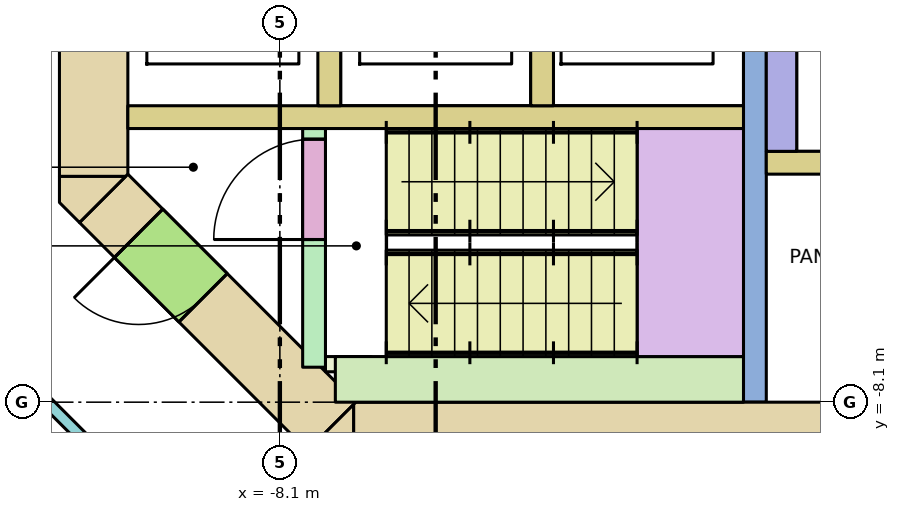
"""IFC4 building model, lengths in metres.
Left out: names, types, materials, properties, quantities, classifications, styles, units other than length and angle.
Written with IfcOpenShell. Run it as: python <this file> out.ifc"""

import sys

from ifc_helpers import new_model, si_unit, direction, frame, frame_2d, origin, place, context, subcontext, project, spatial, polyline, rectangle, outline, extrude, element, fill, save


model = new_model("IFC4")
c1 = context("Model", 3, precision=1e-05, world=origin(), true_north=direction((0.0, 1.0)))
c2 = subcontext(c1, "Body", "Model", "MODEL_VIEW")
j1 = project(units=[si_unit("LENGTHUNIT", "METRE"), si_unit("PLANEANGLEUNIT", "RADIAN")], contexts=[c1])
p1 = place(None, origin())
s1 = spatial("IfcSite", under=j1, at=p1, CompositionType="ELEMENT")
p2 = place(p1, origin())
s2 = spatial("IfcBuilding", under=s1, at=p2, CompositionType="ELEMENT")
p3 = place(p2, frame((0.0, 0.0, 86.6)))
s3 = spatial("IfcBuildingStorey", under=s2, at=p3, CompositionType="ELEMENT", Elevation=86.6)
p4 = place(p3, frame((-7.13, -8.55, -0.28), z_axis=(0.0, 0.0, 1.0), x_axis=(1.0, 0.0, 0.0)))
e1 = element("IfcWall", 1, at=p4, inside=s3, PredefinedType="SHEAR", context=c2, shape_type="SweptSolid", body=[
    extrude(rectangle(XDim=14.26, YDim=0.9, at=frame_2d((7.13, 0.0))), origin(), (0.0, 0.0, 1.0), 4.0),
])
p5 = place(p4, frame((8.08, 0.0, 0.28)))
e2 = element("IfcOpeningElement", 2, at=p5, cuts=e1, PredefinedType="OPENING", context=c2, shape_type="SweptSolid", body=[
    extrude(rectangle(XDim=0.7, YDim=2.1, at=frame_2d((0.35, 1.05))), frame((0.0, 0.46, 0.0), z_axis=(0.0, -1.0, 0.0), x_axis=(1.0, 0.0, 0.0)), (0.0, 0.0, 1.0), 0.92),
])
p6 = place(p4, frame((6.205, 0.0, 0.28)))
e3 = element("IfcOpeningElement", 3, at=p6, cuts=e1, PredefinedType="OPENING", context=c2, shape_type="SweptSolid", body=[
    extrude(rectangle(XDim=0.9, YDim=2.1, at=frame_2d((0.45, 1.05))), frame((0.0, 0.46, 0.0), z_axis=(0.0, -1.0, 0.0), x_axis=(1.0, 0.0, 0.0)), (0.0, 0.0, 1.0), 0.92),
])
p7 = place(p4, frame((10.667, 0.0, 0.28)))
e4 = element("IfcOpeningElement", 4, at=p7, cuts=e1, PredefinedType="OPENING", context=c2, shape_type="SweptSolid", body=[
    extrude(rectangle(XDim=0.9, YDim=2.1, at=frame_2d((0.45, 1.05))), frame((0.0, 0.46, 0.0), z_axis=(0.0, -1.0, 0.0), x_axis=(1.0, 0.0, 0.0)), (0.0, 0.0, 1.0), 0.92),
])
p8 = place(p3, frame((-10.55, -5.13, -0.28), z_axis=(0.0, 0.0, 1.0), x_axis=(0.0, 1.0, 0.0)))
e5 = element("IfcWall", 5, at=p8, inside=s3, PredefinedType="SHEAR", context=c2, shape_type="SweptSolid", body=[
    extrude(rectangle(XDim=10.26, YDim=0.9, at=frame_2d((5.13, 0.0))), origin(), (0.0, 0.0, 1.0), 4.0),
])
p9 = place(p8, frame((4.13, 0.0, 0.28)))
e6 = element("IfcOpeningElement", 6, at=p9, cuts=e5, PredefinedType="OPENING", context=c2, shape_type="SweptSolid", body=[
    extrude(rectangle(XDim=2.0, YDim=2.1, at=frame_2d((1.0, 1.05))), frame((0.0, 0.46, 0.0), z_axis=(0.0, -1.0, 0.0), x_axis=(1.0, 0.0, 0.0)), (0.0, 0.0, 1.0), 0.92),
])
p10 = place(p3, frame((-7.418, -8.418, -0.28), z_axis=(0.0, 0.0, 1.0), x_axis=(-0.707106781187, 0.707106781187, 0.0)))
e7 = element("IfcWall", 7, at=p10, inside=s3, PredefinedType="SHEAR", context=c2, shape_type="SweptSolid", body=[
    extrude(rectangle(XDim=4.243, YDim=0.9, at=frame_2d((2.121, 0.0))), origin(), (0.0, 0.0, 1.0), 4.0),
])
p11 = place(p10, frame((2.393, 0.0, 0.28)))
e8 = element("IfcOpeningElement", 8, at=p11, cuts=e7, PredefinedType="OPENING", context=c2, shape_type="SweptSolid", body=[
    extrude(rectangle(XDim=1.2, YDim=2.1, at=frame_2d((0.6, 1.05))), frame((0.0, 0.46, 0.0), z_axis=(0.0, -1.0, 0.0), x_axis=(1.0, 0.0, 0.0)), (0.0, 0.0, 1.0), 0.92),
])
p12 = place(p3, frame((0.0, 0.0, -0.28)))
e9 = element("IfcWall", 9, at=p12, inside=s3, PredefinedType="SHEAR", context=c2, shape_type="SweptSolid", body=[
    extrude(outline(polyline([(-7.473, -9.0), (-7.736, -8.736), (-7.13, -8.13), (-7.13, -9.0), (-7.473, -9.0)])), origin(), (0.0, 0.0, 1.0), 4.0),
])
p13 = place(p3, frame((0.0, 0.0, -0.28)))
e10 = element("IfcWall", 10, at=p13, inside=s3, PredefinedType="SHEAR", context=c2, shape_type="SweptSolid", body=[
    extrude(outline(polyline([(-11.0, -5.473), (-11.0, -5.13), (-10.13, -5.13), (-10.736, -5.736), (-11.0, -5.473)])), origin(), (0.0, 0.0, 1.0), 4.0),
])
p14 = place(p3, frame((-10.1, -4.35, 0.0), z_axis=(0.0, 0.0, 1.0), x_axis=(1.0, 0.0, 0.0)))
e11 = element("IfcWall", 11, at=p14, inside=s3, PredefinedType="SOLIDWALL", context=c2, shape_type="SweptSolid", body=[
    extrude(rectangle(XDim=8.1, YDim=0.3, at=frame_2d((4.05, 0.0))), origin(), (0.0, 0.0, 1.0), 3.72),
])
for number, where, z_axis, x_axis in (
    (12, (-7.45, -4.2, 0.0), (0.0, 0.0, 1.0), (0.0, 1.0, 0.0)),
    (13, (-4.65, -4.2, 0.0), (0.0, 0.0, 1.0), (0.0, 1.0, 0.0)),
):
    element("IfcWall", number, at=place(p3, frame(where, z_axis=z_axis, x_axis=x_axis)), inside=s3, PredefinedType="SOLIDWALL", context=c2, shape_type="SweptSolid", body=[
        extrude(rectangle(XDim=2.4, YDim=0.3, at=frame_2d((1.2, 0.0))), origin(), (0.0, 0.0, 1.0), 3.72),
    ])
p15 = place(p3, frame((-1.85, -8.1, 0.0), z_axis=(0.0, 0.0, 1.0), x_axis=(0.0, 1.0, 0.0)))
e14 = element("IfcWall", 14, at=p15, inside=s3, PredefinedType="SHEAR", context=c2, shape_type="SweptSolid", body=[
    extrude(rectangle(XDim=6.6, YDim=0.3, at=frame_2d((3.3, 0.0))), origin(), (0.0, 0.0, 1.0), 3.72),
])
p16 = place(p3, frame((-1.5, -4.8, 0.0), z_axis=(0.0, 0.0, 1.0), x_axis=(0.0, 1.0, 0.0)))
e15 = element("IfcWall", 15, at=p16, inside=s3, PredefinedType="SOLIDWALL", context=c2, shape_type="SweptSolid", body=[
    extrude(rectangle(XDim=3.0, YDim=0.4, at=frame_2d((1.5, 0.0))), origin(), (0.0, 0.0, 1.0), 3.72),
])
p17 = place(p3, frame((-1.7, -4.95, 0.0), z_axis=(0.0, 0.0, 1.0), x_axis=(1.0, 0.0, 0.0)))
e16 = element("IfcWall", 16, at=p17, inside=s3, PredefinedType="SOLIDWALL", context=c2, shape_type="SweptSolid", body=[
    extrude(rectangle(XDim=3.4, YDim=0.3, at=frame_2d((1.7, 0.0))), origin(), (0.0, 0.0, 1.0), 3.72),
])
p18 = place(p3, frame((-7.65, -7.64, 0.0), z_axis=(0.0, 0.0, 1.0), x_axis=(0.0, 1.0, 0.0)))
e17 = element("IfcWall", 17, at=p18, inside=s3, PredefinedType="SHEAR", context=c2, shape_type="SweptSolid", body=[
    extrude(rectangle(XDim=3.14, YDim=0.3, at=frame_2d((1.57, 0.0))), origin(), (0.0, 0.0, 1.0), 3.72),
])
p19 = place(p18, frame((1.68, 0.0, 0.0)))
e18 = element("IfcOpeningElement", 18, at=p19, cuts=e17, PredefinedType="OPENING", context=c2, shape_type="SweptSolid", body=[
    extrude(rectangle(XDim=1.32, YDim=2.1, at=frame_2d((0.66, 1.05))), frame((0.0, 0.16, 0.0), z_axis=(0.0, -1.0, 0.0), x_axis=(1.0, 0.0, 0.0)), (0.0, 0.0, 1.0), 0.32),
])
p20 = place(p3, frame((-7.5, -7.6, 0.0), z_axis=(0.0, 0.0, 1.0), x_axis=(1.0, 0.0, 0.0)))
e19 = element("IfcWall", 19, at=p20, inside=s3, PredefinedType="SHEAR", context=c2, shape_type="SweptSolid", body=[
    extrude(rectangle(XDim=0.6, YDim=0.2, at=frame_2d((0.3, 0.0))), origin(), (0.0, 0.0, 1.0), 3.72),
])
p21 = place(p3, frame((-7.37, -7.8, 0.0), z_axis=(0.0, 0.0, 1.0), x_axis=(1.0, 0.0, 0.0)))
e20 = element("IfcWall", 20, at=p21, inside=s3, PredefinedType="SHEAR", context=c2, shape_type="SweptSolid", body=[
    extrude(rectangle(XDim=5.37, YDim=0.6, at=frame_2d((2.685, 0.0))), origin(), (0.0, 0.0, 1.0), 3.72),
])
p22 = place(p3, frame((-8.291, -10.975, 0.0), z_axis=(0.0, 0.0, 1.0), x_axis=(-0.707088206597, 0.707125355289, 0.0)))
e21 = element("IfcWall", 21, at=p22, inside=s3, PredefinedType="PARTITIONING", context=c2, shape_type="SweptSolid", body=[
    extrude(rectangle(XDim=6.572, YDim=0.15, at=frame_2d((3.286, 0.0))), origin(), (0.0, 0.0, 1.0), 2.82),
])
p23 = place(p19, origin())
e22 = element("IfcDoor", 22, at=p23, inside=s3, OperationType="DOUBLE_DOOR_SINGLE_SWING", PredefinedType="DOOR", context=c2, shape_type="SweptSolid", body=[
    extrude(rectangle(XDim=1.32, YDim=2.1, at=frame_2d((0.66, 1.05))), frame((0.0, 0.025, 0.0), z_axis=(0.0, -1.0, 0.0), x_axis=(1.0, 0.0, 0.0)), (0.0, 0.0, 1.0), 0.05),
])
fill(e18, e22)
p24 = place(p11, origin())
e23 = element("IfcDoor", 23, at=p24, inside=s3, OperationType="SINGLE_SWING_RIGHT", PredefinedType="DOOR", context=c2, shape_type="SweptSolid", body=[
    extrude(rectangle(XDim=1.2, YDim=2.1, at=frame_2d((0.6, 1.05))), frame((0.0, 0.025, 0.0), z_axis=(0.0, -1.0, 0.0), x_axis=(1.0, 0.0, 0.0)), (0.0, 0.0, 1.0), 0.05),
])
fill(e8, e23)
save(model, sys.argv[1])
